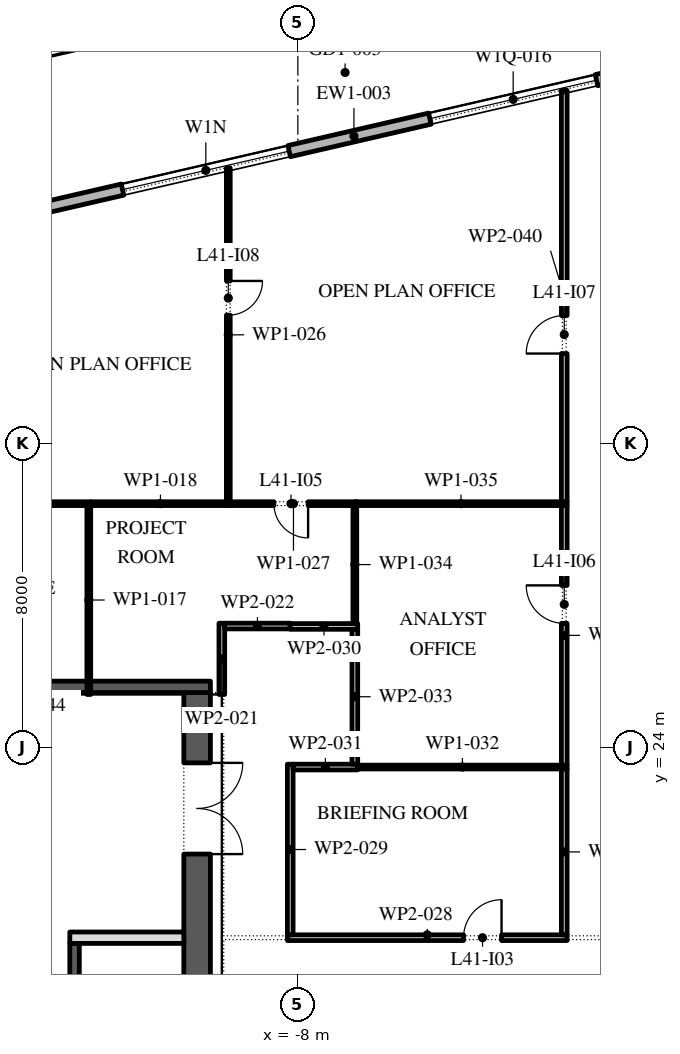
"""IFC4 building model, lengths in metres.
Left out: names, types, materials, properties, quantities, classifications, styles, units other than length and angle.
Written with IfcOpenShell. Run it as: python <this file> out.ifc"""

import sys

from ifc_helpers import new_model, si_unit, direction, frame, frame_2d, origin, place, context, subcontext, project, spatial, rectangle, extrude, element, fill, save


model = new_model("IFC4")
c1 = context("Model", 3, precision=1e-05, world=origin(), true_north=direction((0.0, 1.0)))
c2 = subcontext(c1, "Body", "Model", "MODEL_VIEW")
j1 = project(units=[si_unit("LENGTHUNIT", "METRE"), si_unit("PLANEANGLEUNIT", "RADIAN")], contexts=[c1])
p1 = place(None, origin())
s1 = spatial("IfcSite", under=j1, at=p1, CompositionType="ELEMENT")
p2 = place(p1, origin())
s2 = spatial("IfcBuilding", under=s1, at=p2, CompositionType="ELEMENT")
p3 = place(p2, frame((0.0, 0.0, 188.4)))
s3 = spatial("IfcBuildingStorey", under=s2, at=p3, CompositionType="ELEMENT", Elevation=188.4)
p4 = place(p3, frame((17.592, 45.657, 0.0), z_axis=(0.0, 0.0, 1.0), x_axis=(-0.974370243697, -0.224950279389, 0.0)))
e1 = element("IfcWall", 1, at=p4, inside=s3, PredefinedType="STANDARD", context=c2, shape_type="SweptSolid", body=[
    extrude(rectangle(XDim=49.5, YDim=0.3, at=frame_2d((24.75, 0.0))), origin(), (0.0, 0.0, 1.0), 4.0),
])
p5 = place(p4, frame((2.8, 0.0, 0.0)))
e2 = element("IfcOpeningElement", 2, at=p5, cuts=e1, PredefinedType="OPENING", context=c2, shape_type="SweptSolid", body=[
    extrude(rectangle(XDim=2.4, YDim=3.5, at=frame_2d((1.2, 1.75))), frame((0.0, 0.16, 0.0), z_axis=(0.0, -1.0, 0.0), x_axis=(1.0, 0.0, 0.0)), (0.0, 0.0, 1.0), 0.32),
])
p6 = place(p4, frame((9.9, 0.0, 0.45)))
e3 = element("IfcOpeningElement", 3, at=p6, cuts=e1, PredefinedType="OPENING", context=c2, shape_type="SweptSolid", body=[
    extrude(rectangle(XDim=4.5, YDim=2.45, at=frame_2d((2.25, 1.225))), frame((0.0, 0.16, 0.0), z_axis=(0.0, -1.0, 0.0), x_axis=(1.0, 0.0, 0.0)), (0.0, 0.0, 1.0), 0.32),
])
p7 = place(p4, frame((18.2, 0.0, 0.45)))
e4 = element("IfcOpeningElement", 4, at=p7, cuts=e1, PredefinedType="OPENING", context=c2, shape_type="SweptSolid", body=[
    extrude(rectangle(XDim=4.5, YDim=2.45, at=frame_2d((2.25, 1.225))), frame((0.0, 0.16, 0.0), z_axis=(0.0, -1.0, 0.0), x_axis=(1.0, 0.0, 0.0)), (0.0, 0.0, 1.0), 0.32),
])
p8 = place(p4, frame((26.5, 0.0, 0.45)))
e5 = element("IfcOpeningElement", 5, at=p8, cuts=e1, PredefinedType="OPENING", context=c2, shape_type="SweptSolid", body=[
    extrude(rectangle(XDim=4.5, YDim=2.525, at=frame_2d((2.25, 1.262))), frame((0.0, 0.16, 0.0), z_axis=(0.0, -1.0, 0.0), x_axis=(1.0, 0.0, 0.0)), (0.0, 0.0, 1.0), 0.32),
])
p9 = place(p4, frame((35.85, 0.0, 0.0)))
e6 = element("IfcOpeningElement", 6, at=p9, cuts=e1, PredefinedType="OPENING", context=c2, shape_type="SweptSolid", body=[
    extrude(rectangle(XDim=2.4, YDim=3.5, at=frame_2d((1.2, 1.75))), frame((0.0, 0.16, 0.0), z_axis=(0.0, -1.0, 0.0), x_axis=(1.0, 0.0, 0.0)), (0.0, 0.0, 1.0), 0.32),
])
p10 = place(p4, frame((43.1, 0.0, 0.45)))
e7 = element("IfcOpeningElement", 7, at=p10, cuts=e1, PredefinedType="OPENING", context=c2, shape_type="SweptSolid", body=[
    extrude(rectangle(XDim=4.5, YDim=2.675, at=frame_2d((2.25, 1.337))), frame((0.0, 0.16, 0.0), z_axis=(0.0, -1.0, 0.0), x_axis=(1.0, 0.0, 0.0)), (0.0, 0.0, 1.0), 0.32),
])
p11 = place(p3, frame((-10.65, -2.45, 0.0), z_axis=(0.0, 0.0, 1.0), x_axis=(0.0, 1.0, 0.0)))
e8 = element("IfcWall", 8, at=p11, inside=s3, PredefinedType="SHEAR", context=c2, shape_type="SweptSolid", body=[
    extrude(rectangle(XDim=27.9, YDim=0.7, at=frame_2d((13.95, 0.0))), origin(), (0.0, 0.0, 1.0), 4.0),
])
p12 = place(p11, frame((23.65, 0.0, 0.0)))
e9 = element("IfcOpeningElement", 9, at=p12, cuts=e8, PredefinedType="OPENING", context=c2, shape_type="SweptSolid", body=[
    extrude(rectangle(XDim=2.4, YDim=2.1, at=frame_2d((1.2, 1.05))), frame((0.0, 0.36, 0.0), z_axis=(0.0, -1.0, 0.0), x_axis=(1.0, 0.0, 0.0)), (0.0, 0.0, 1.0), 0.72),
])
p13 = place(p11, frame((0.788, 0.0, 0.0)))
e10 = element("IfcOpeningElement", 10, at=p13, cuts=e8, PredefinedType="OPENING", context=c2, shape_type="SweptSolid", body=[
    extrude(rectangle(XDim=0.9, YDim=2.1, at=frame_2d((0.45, 1.05))), frame((0.0, 0.36, 0.0), z_axis=(0.0, -1.0, 0.0), x_axis=(1.0, 0.0, 0.0)), (0.0, 0.0, 1.0), 0.72),
])
p14 = place(p11, frame((3.962, 0.0, 0.0)))
e11 = element("IfcOpeningElement", 11, at=p14, cuts=e8, PredefinedType="OPENING", context=c2, shape_type="SweptSolid", body=[
    extrude(rectangle(XDim=1.0, YDim=2.1, at=frame_2d((0.5, 1.05))), frame((0.0, 0.36, 0.0), z_axis=(0.0, -1.0, 0.0), x_axis=(1.0, 0.0, 0.0)), (0.0, 0.0, 1.0), 0.72),
])
p15 = place(p3, frame((-21.7, 25.6, 0.0), z_axis=(0.0, 0.0, 1.0), x_axis=(1.0, 0.0, 0.0)))
e12 = element("IfcWall", 12, at=p15, inside=s3, PredefinedType="SHEAR", context=c2, shape_type="SweptSolid", body=[
    extrude(rectangle(XDim=11.4, YDim=0.3, at=frame_2d((5.7, 0.0))), origin(), (0.0, 0.0, 1.0), 4.0),
])
p16 = place(p3, frame((-13.875, -2.45, 0.0), z_axis=(0.0, 0.0, 1.0), x_axis=(0.0, 1.0, 0.0)))
e13 = element("IfcWall", 13, at=p16, inside=s3, PredefinedType="SHEAR", context=c2, shape_type="SweptSolid", body=[
    extrude(rectangle(XDim=21.3, YDim=0.25, at=frame_2d((10.65, 0.0))), origin(), (0.0, 0.0, 1.0), 4.0),
])
p17 = place(p16, frame((17.786, 0.0, 0.0)))
e14 = element("IfcOpeningElement", 14, at=p17, cuts=e13, PredefinedType="OPENING", context=c2, shape_type="SweptSolid", body=[
    extrude(rectangle(XDim=0.9, YDim=2.1, at=frame_2d((0.45, 1.05))), frame((0.0, 0.135, 0.0), z_axis=(0.0, -1.0, 0.0), x_axis=(1.0, 0.0, 0.0)), (0.0, 0.0, 1.0), 0.27),
])
p18 = place(p16, frame((6.971, 0.0, 0.0)))
e15 = element("IfcOpeningElement", 15, at=p18, cuts=e13, PredefinedType="OPENING", context=c2, shape_type="SweptSolid", body=[
    extrude(rectangle(XDim=1.1, YDim=2.1, at=frame_2d((0.55, 1.05))), frame((0.0, 0.135, 0.0), z_axis=(0.0, -1.0, 0.0), x_axis=(1.0, 0.0, 0.0)), (0.0, 0.0, 1.0), 0.27),
])
p19 = place(p16, frame((9.114, 0.0, 0.0)))
e16 = element("IfcOpeningElement", 16, at=p19, cuts=e13, PredefinedType="OPENING", context=c2, shape_type="SweptSolid", body=[
    extrude(rectangle(XDim=1.1, YDim=2.1, at=frame_2d((0.55, 1.05))), frame((0.0, 0.135, 0.0), z_axis=(0.0, -1.0, 0.0), x_axis=(1.0, 0.0, 0.0)), (0.0, 0.0, 1.0), 0.27),
])
p20 = place(p16, frame((11.257, 0.0, 0.0)))
e17 = element("IfcOpeningElement", 17, at=p20, cuts=e13, PredefinedType="OPENING", context=c2, shape_type="SweptSolid", body=[
    extrude(rectangle(XDim=1.1, YDim=2.1, at=frame_2d((0.55, 1.05))), frame((0.0, 0.135, 0.0), z_axis=(0.0, -1.0, 0.0), x_axis=(1.0, 0.0, 0.0)), (0.0, 0.0, 1.0), 0.27),
])
p21 = place(p16, frame((13.4, 0.0, 0.0)))
e18 = element("IfcOpeningElement", 18, at=p21, cuts=e13, PredefinedType="OPENING", context=c2, shape_type="SweptSolid", body=[
    extrude(rectangle(XDim=1.1, YDim=2.1, at=frame_2d((0.55, 1.05))), frame((0.0, 0.135, 0.0), z_axis=(0.0, -1.0, 0.0), x_axis=(1.0, 0.0, 0.0)), (0.0, 0.0, 1.0), 0.27),
])
p22 = place(p3, frame((-14.0, 19.0, 0.0), z_axis=(0.0, 0.0, 1.0), x_axis=(1.0, 0.0, 0.0)))
e19 = element("IfcWall", 19, at=p22, inside=s3, PredefinedType="PARTITIONING", context=c2, shape_type="SweptSolid", body=[
    extrude(rectangle(XDim=3.0, YDim=0.3, at=frame_2d((1.5, 0.0))), origin(), (0.0, 0.0, 1.0), 4.0),
])
p23 = place(p3, frame((-22.47, 30.42, 0.0), z_axis=(0.0, 0.0, 1.0), x_axis=(1.0, 0.0, 0.0)))
e20 = element("IfcWall", 20, at=p23, inside=s3, PredefinedType="PARTITIONING", context=c2, shape_type="SweptSolid", body=[
    extrude(rectangle(XDim=9.02, YDim=0.1, at=frame_2d((4.51, 0.0))), origin(), (0.0, 0.0, 1.0), 4.0),
])
p24 = place(p3, frame((-13.5, 30.37, 0.0), z_axis=(0.0, 0.0, 1.0), x_axis=(0.0, -1.0, 0.0)))
e21 = element("IfcWall", 21, at=p24, inside=s3, PredefinedType="PARTITIONING", context=c2, shape_type="SweptSolid", body=[
    extrude(rectangle(XDim=4.97, YDim=0.1, at=frame_2d((2.485, 0.0))), origin(), (0.0, 0.0, 1.0), 4.0),
])
p25 = place(p3, frame((-13.45, 30.42, 0.0), z_axis=(0.0, 0.0, 1.0), x_axis=(1.0, 0.0, 0.0)))
e22 = element("IfcWall", 22, at=p25, inside=s3, PredefinedType="PARTITIONING", context=c2, shape_type="SweptSolid", body=[
    extrude(rectangle(XDim=3.67, YDim=0.1, at=frame_2d((1.835, 0.0))), origin(), (0.0, 0.0, 1.0), 4.0),
])
p26 = place(p3, frame((-10.0, 25.4, 0.0), z_axis=(0.0, 0.0, 1.0), x_axis=(0.0, 1.0, 0.0)))
e23 = element("IfcWall", 23, at=p26, inside=s3, PredefinedType="PARTITIONING", context=c2, shape_type="SweptSolid", body=[
    extrude(rectangle(XDim=1.875, YDim=0.15, at=frame_2d((0.938, 0.0))), origin(), (0.0, 0.0, 1.0), 4.0),
])
p27 = place(p3, frame((-9.925, 27.2, 0.0), z_axis=(0.0, 0.0, 1.0), x_axis=(1.0, 0.0, 0.0)))
e24 = element("IfcWall", 24, at=p27, inside=s3, PredefinedType="PARTITIONING", context=c2, shape_type="SweptSolid", body=[
    extrude(rectangle(XDim=1.725, YDim=0.15, at=frame_2d((0.863, 0.0))), origin(), (0.0, 0.0, 1.0), 4.0),
])
p28 = place(p3, frame((-9.83, 30.47, 0.0), z_axis=(0.0, 0.0, 1.0), x_axis=(0.0, 1.0, 0.0)))
e25 = element("IfcWall", 25, at=p28, inside=s3, PredefinedType="PARTITIONING", context=c2, shape_type="SweptSolid", body=[
    extrude(rectangle(XDim=8.785, YDim=0.1, at=frame_2d((4.393, 0.0))), origin(), (0.0, 0.0, 1.0), 4.0),
])
p29 = place(p28, frame((4.91, 0.0, 0.0)))
e26 = element("IfcOpeningElement", 26, at=p29, cuts=e25, PredefinedType="OPENING", context=c2, shape_type="SweptSolid", body=[
    extrude(rectangle(XDim=0.9, YDim=2.1, at=frame_2d((0.45, 1.05))), frame((0.0, 0.06, 0.0), z_axis=(0.0, -1.0, 0.0), x_axis=(1.0, 0.0, 0.0)), (0.0, 0.0, 1.0), 0.12),
])
p30 = place(p3, frame((-9.78, 30.42, 0.0), z_axis=(0.0, 0.0, 1.0), x_axis=(1.0, 0.0, 0.0)))
e27 = element("IfcWall", 27, at=p30, inside=s3, PredefinedType="PARTITIONING", context=c2, shape_type="SweptSolid", body=[
    extrude(rectangle(XDim=3.33, YDim=0.1, at=frame_2d((1.665, 0.0))), origin(), (0.0, 0.0, 1.0), 4.0),
])
p31 = place(p30, frame((1.15, 0.0, 0.0)))
e28 = element("IfcOpeningElement", 28, at=p31, cuts=e27, PredefinedType="OPENING", context=c2, shape_type="SweptSolid", body=[
    extrude(rectangle(XDim=0.9, YDim=2.1, at=frame_2d((0.45, 1.05))), frame((0.0, 0.06, 0.0), z_axis=(0.0, -1.0, 0.0), x_axis=(1.0, 0.0, 0.0)), (0.0, 0.0, 1.0), 0.12),
])
p32 = place(p3, frame((-8.275, 19.0, 0.0), z_axis=(0.0, 0.0, 1.0), x_axis=(1.0, 0.0, 0.0)))
e29 = element("IfcWall", 29, at=p32, inside=s3, PredefinedType="PARTITIONING", context=c2, shape_type="SweptSolid", body=[
    extrude(rectangle(XDim=7.36, YDim=0.15, at=frame_2d((3.68, 0.0))), origin(), (0.0, 0.0, 1.0), 4.0),
])
p33 = place(p32, frame((4.635, 0.0, 0.0)))
e30 = element("IfcOpeningElement", 30, at=p33, cuts=e29, PredefinedType="OPENING", context=c2, shape_type="SweptSolid", body=[
    extrude(rectangle(XDim=1.0, YDim=2.1, at=frame_2d((0.5, 1.05))), frame((0.0, 0.085, 0.0), z_axis=(0.0, -1.0, 0.0), x_axis=(1.0, 0.0, 0.0)), (0.0, 0.0, 1.0), 0.17),
])
p34 = place(p3, frame((-8.2, 23.565, 0.0), z_axis=(0.0, 0.0, 1.0), x_axis=(0.0, -1.0, 0.0)))
e31 = element("IfcWall", 31, at=p34, inside=s3, PredefinedType="PARTITIONING", context=c2, shape_type="SweptSolid", body=[
    extrude(rectangle(XDim=4.49, YDim=0.15, at=frame_2d((2.245, 0.0))), origin(), (0.0, 0.0, 1.0), 4.0),
])
p35 = place(p3, frame((-8.2, 27.19, 0.0), z_axis=(0.0, 0.0, 1.0), x_axis=(1.0, 0.0, 0.0)))
e32 = element("IfcWall", 32, at=p35, inside=s3, PredefinedType="PARTITIONING", context=c2, shape_type="SweptSolid", body=[
    extrude(rectangle(XDim=1.775, YDim=0.15, at=frame_2d((0.887, 0.0))), origin(), (0.0, 0.0, 1.0), 4.0),
])
p36 = place(p3, frame((-6.425, 23.49, 0.0), z_axis=(0.0, 0.0, 1.0), x_axis=(-1.0, 0.0, 0.0)))
e33 = element("IfcWall", 33, at=p36, inside=s3, PredefinedType="PARTITIONING", context=c2, shape_type="SweptSolid", body=[
    extrude(rectangle(XDim=1.7, YDim=0.15, at=frame_2d((0.85, 0.0))), origin(), (0.0, 0.0, 1.0), 4.0),
])
p37 = place(p3, frame((-6.425, 23.49, 0.0), z_axis=(0.0, 0.0, 1.0), x_axis=(1.0, 0.0, 0.0)))
e34 = element("IfcWall", 34, at=p37, inside=s3, PredefinedType="PARTITIONING", context=c2, shape_type="SweptSolid", body=[
    extrude(rectangle(XDim=5.51, YDim=0.1, at=frame_2d((2.755, 0.0))), origin(), (0.0, 0.0, 1.0), 4.0),
])
p38 = place(p3, frame((-6.5, 27.115, 0.0), z_axis=(0.0, 0.0, 1.0), x_axis=(0.0, -1.0, 0.0)))
e35 = element("IfcWall", 35, at=p38, inside=s3, PredefinedType="PARTITIONING", context=c2, shape_type="SweptSolid", body=[
    extrude(rectangle(XDim=3.55, YDim=0.15, at=frame_2d((1.775, 0.0))), origin(), (0.0, 0.0, 1.0), 4.0),
])
p39 = place(p3, frame((-6.5, 30.37, 0.0), z_axis=(0.0, 0.0, 1.0), x_axis=(0.0, -1.0, 0.0)))
e36 = element("IfcWall", 36, at=p39, inside=s3, PredefinedType="PARTITIONING", context=c2, shape_type="SweptSolid", body=[
    extrude(rectangle(XDim=3.105, YDim=0.1, at=frame_2d((1.553, 0.0))), origin(), (0.0, 0.0, 1.0), 4.0),
])
p40 = place(p3, frame((-6.5, 30.42, 0.0), z_axis=(0.0, 0.0, 1.0), x_axis=(1.0, 0.0, 0.0)))
e37 = element("IfcWall", 37, at=p40, inside=s3, PredefinedType="PARTITIONING", context=c2, shape_type="SweptSolid", body=[
    extrude(rectangle(XDim=5.585, YDim=0.1, at=frame_2d((2.792, 0.0))), origin(), (0.0, 0.0, 1.0), 4.0),
])
p41 = place(p3, frame((-0.99, 19.075, 0.0), z_axis=(0.0, 0.0, 1.0), x_axis=(0.0, 1.0, 0.0)))
e38 = element("IfcWall", 38, at=p41, inside=s3, PredefinedType="PARTITIONING", context=c2, shape_type="SweptSolid", body=[
    extrude(rectangle(XDim=4.365, YDim=0.15, at=frame_2d((2.183, 0.0))), origin(), (0.0, 0.0, 1.0), 4.0),
])
p42 = place(p3, frame((-0.99, 23.54, 0.0), z_axis=(0.0, 0.0, 1.0), x_axis=(0.0, 1.0, 0.0)))
e39 = element("IfcWall", 39, at=p42, inside=s3, PredefinedType="PARTITIONING", context=c2, shape_type="SweptSolid", body=[
    extrude(rectangle(XDim=6.83, YDim=0.15, at=frame_2d((3.415, 0.0))), origin(), (0.0, 0.0, 1.0), 4.0),
])
p43 = place(p42, frame((3.73, 0.0, 0.0)))
e40 = element("IfcOpeningElement", 40, at=p43, cuts=e39, PredefinedType="OPENING", context=c2, shape_type="SweptSolid", body=[
    extrude(rectangle(XDim=1.0, YDim=2.1, at=frame_2d((0.5, 1.05))), frame((0.0, 0.085, 0.0), z_axis=(0.0, -1.0, 0.0), x_axis=(1.0, 0.0, 0.0)), (0.0, 0.0, 1.0), 0.17),
])
p44 = place(p3, frame((-0.99, 30.47, 0.0), z_axis=(0.0, 0.0, 1.0), x_axis=(0.0, 1.0, 0.0)))
e41 = element("IfcWall", 41, at=p44, inside=s3, PredefinedType="PARTITIONING", context=c2, shape_type="SweptSolid", body=[
    extrude(rectangle(XDim=10.826, YDim=0.15, at=frame_2d((5.413, 0.0))), origin(), (0.0, 0.0, 1.0), 4.0),
])
p45 = place(p44, frame((3.9, 0.0, 0.0)))
e42 = element("IfcOpeningElement", 42, at=p45, cuts=e41, PredefinedType="OPENING", context=c2, shape_type="SweptSolid", body=[
    extrude(rectangle(XDim=1.0, YDim=2.1, at=frame_2d((0.5, 1.05))), frame((0.0, 0.085, 0.0), z_axis=(0.0, -1.0, 0.0), x_axis=(1.0, 0.0, 0.0)), (0.0, 0.0, 1.0), 0.17),
])
p46 = place(p7, origin())
e43 = element("IfcWindow", 43, at=p46, inside=s3, PartitioningType="DOUBLE_PANEL_VERTICAL", PredefinedType="WINDOW", context=c2, shape_type="SweptSolid", body=[
    extrude(rectangle(XDim=4.5, YDim=2.45, at=frame_2d((2.25, 1.225))), frame((0.0, 0.03, 0.0), z_axis=(0.0, -1.0, 0.0), x_axis=(1.0, 0.0, 0.0)), (0.0, 0.0, 1.0), 0.06),
])
fill(e4, e43)
p47 = place(p8, origin())
e44 = element("IfcWindow", 44, at=p47, inside=s3, PartitioningType="DOUBLE_PANEL_VERTICAL", PredefinedType="WINDOW", context=c2, shape_type="SweptSolid", body=[
    extrude(rectangle(XDim=4.5, YDim=2.525, at=frame_2d((2.25, 1.262))), frame((0.0, 0.03, 0.0), z_axis=(0.0, -1.0, 0.0), x_axis=(1.0, 0.0, 0.0)), (0.0, 0.0, 1.0), 0.06),
])
fill(e5, e44)
p48 = place(p12, frame((2.4, 0.0, 0.0), z_axis=(0.0, 0.0, 1.0), x_axis=(-1.0, 0.0, 0.0)))
e45 = element("IfcDoor", 45, at=p48, inside=s3, OperationType="DOUBLE_DOOR_SINGLE_SWING", PredefinedType="DOOR", context=c2, shape_type="SweptSolid", body=[
    extrude(rectangle(XDim=2.4, YDim=2.1, at=frame_2d((1.2, 1.05))), frame((0.0, 0.025, 0.0), z_axis=(0.0, -1.0, 0.0), x_axis=(1.0, 0.0, 0.0)), (0.0, 0.0, 1.0), 0.05),
])
fill(e9, e45)
p49 = place(p33, origin())
e46 = element("IfcDoor", 46, at=p49, inside=s3, OperationType="SINGLE_SWING_LEFT", PredefinedType="DOOR", context=c2, shape_type="SweptSolid", body=[
    extrude(rectangle(XDim=1.0, YDim=2.1, at=frame_2d((0.5, 1.05))), frame((0.0, 0.025, 0.0), z_axis=(0.0, -1.0, 0.0), x_axis=(1.0, 0.0, 0.0)), (0.0, 0.0, 1.0), 0.05),
])
fill(e30, e46)
p50 = place(p31, frame((0.9, 0.0, 0.0), z_axis=(0.0, 0.0, 1.0), x_axis=(-1.0, 0.0, 0.0)))
e47 = element("IfcDoor", 47, at=p50, inside=s3, OperationType="SINGLE_SWING_RIGHT", PredefinedType="DOOR", context=c2, shape_type="SweptSolid", body=[
    extrude(rectangle(XDim=0.9, YDim=2.1, at=frame_2d((0.45, 1.05))), frame((0.0, 0.025, 0.0), z_axis=(0.0, -1.0, 0.0), x_axis=(1.0, 0.0, 0.0)), (0.0, 0.0, 1.0), 0.05),
])
fill(e28, e47)
p51 = place(p43, origin())
e48 = element("IfcDoor", 48, at=p51, inside=s3, OperationType="SINGLE_SWING_LEFT", PredefinedType="DOOR", context=c2, shape_type="SweptSolid", body=[
    extrude(rectangle(XDim=1.0, YDim=2.1, at=frame_2d((0.5, 1.05))), frame((0.0, 0.025, 0.0), z_axis=(0.0, -1.0, 0.0), x_axis=(1.0, 0.0, 0.0)), (0.0, 0.0, 1.0), 0.05),
])
fill(e40, e48)
p52 = place(p45, origin())
e49 = element("IfcDoor", 49, at=p52, inside=s3, OperationType="SINGLE_SWING_RIGHT", PredefinedType="DOOR", context=c2, shape_type="SweptSolid", body=[
    extrude(rectangle(XDim=1.0, YDim=2.1, at=frame_2d((0.5, 1.05))), frame((0.0, 0.025, 0.0), z_axis=(0.0, -1.0, 0.0), x_axis=(1.0, 0.0, 0.0)), (0.0, 0.0, 1.0), 0.05),
])
fill(e42, e49)
p53 = place(p29, frame((0.9, 0.0, 0.0), z_axis=(0.0, 0.0, 1.0), x_axis=(-1.0, 0.0, 0.0)))
e50 = element("IfcDoor", 50, at=p53, inside=s3, OperationType="SINGLE_SWING_RIGHT", PredefinedType="DOOR", context=c2, shape_type="SweptSolid", body=[
    extrude(rectangle(XDim=0.9, YDim=2.1, at=frame_2d((0.45, 1.05))), frame((0.0, 0.025, 0.0), z_axis=(0.0, -1.0, 0.0), x_axis=(1.0, 0.0, 0.0)), (0.0, 0.0, 1.0), 0.05),
])
fill(e26, e50)
save(model, sys.argv[1])
